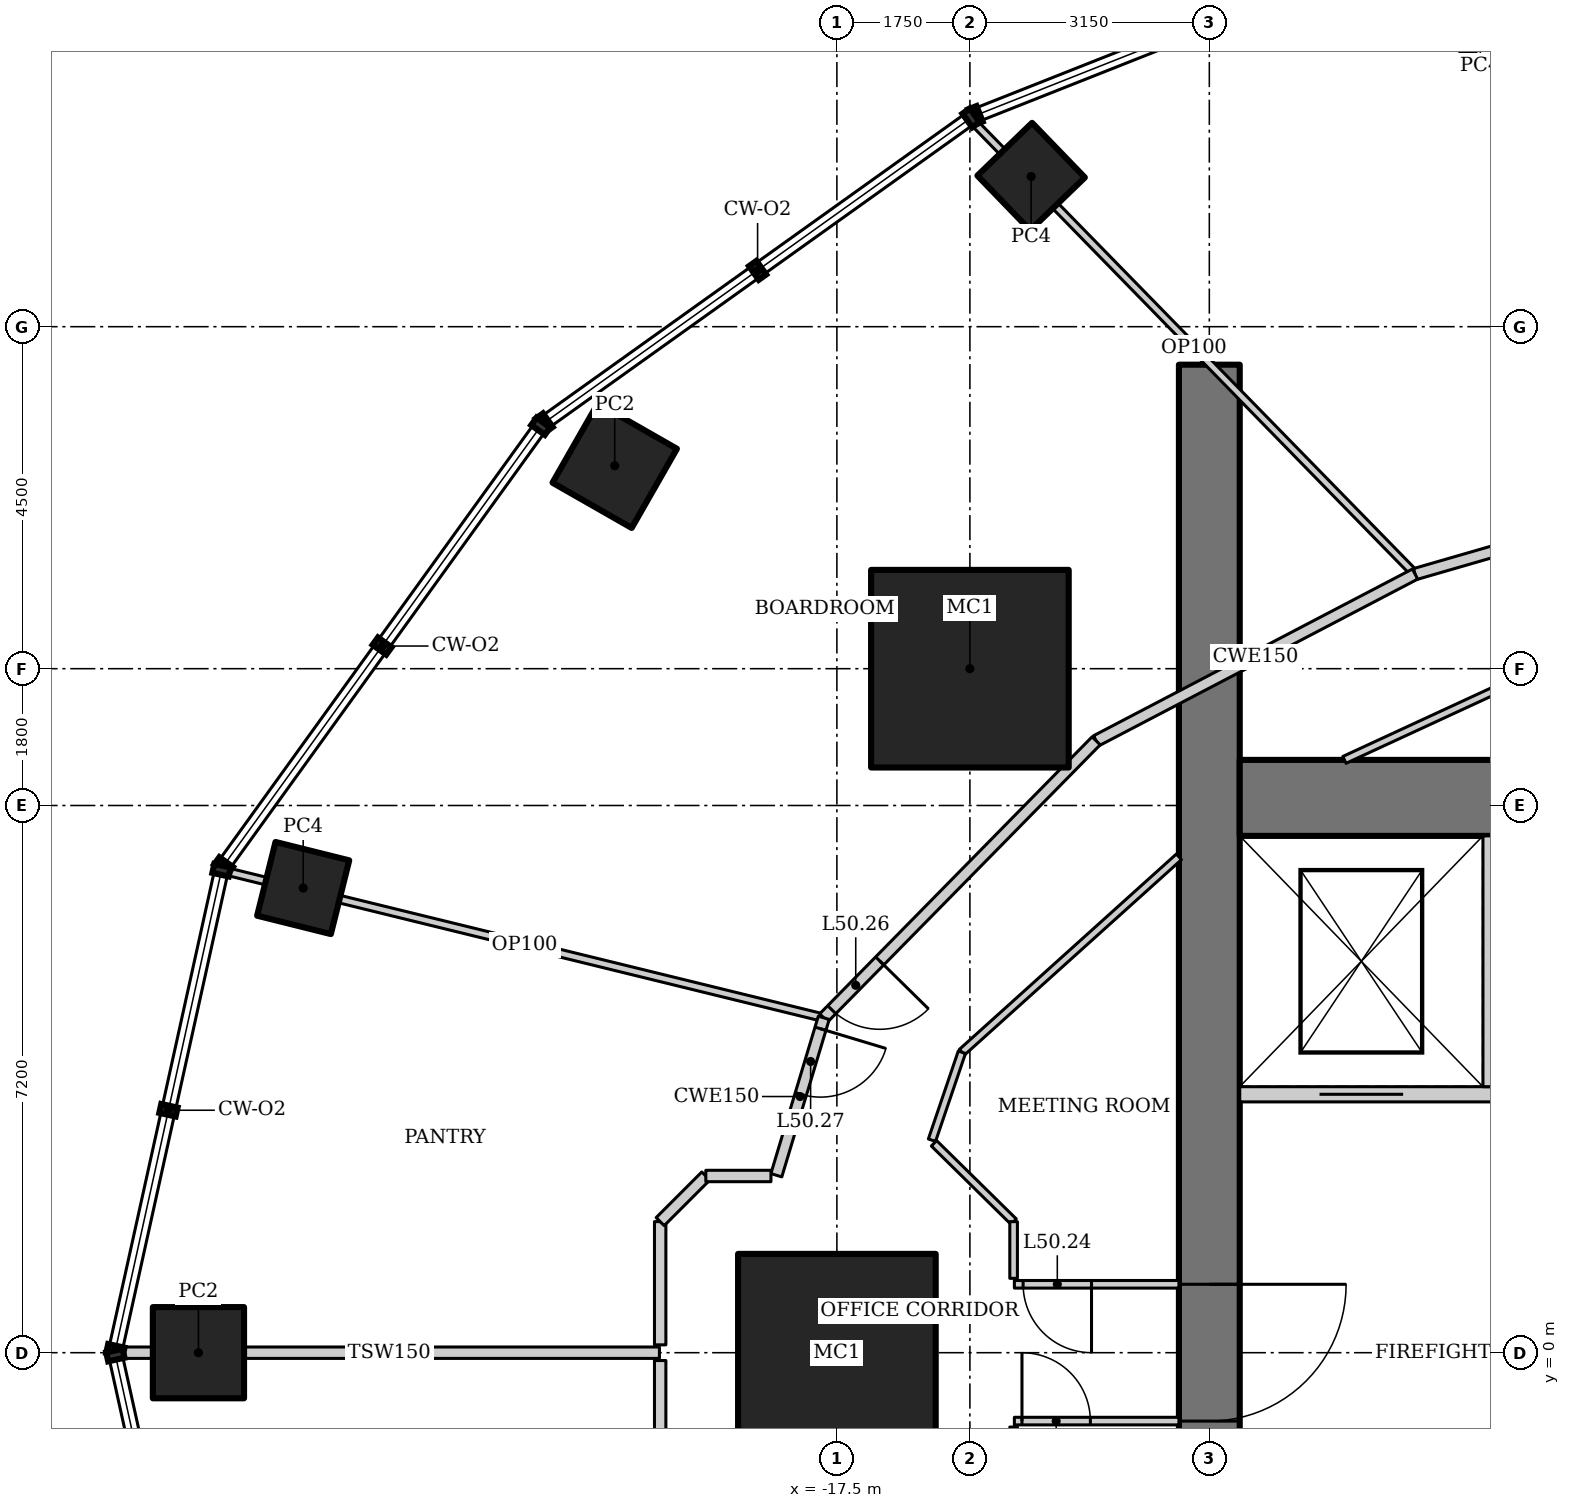
"""IFC4 building model, lengths in metres.
Left out: names, types, materials, properties, quantities, classifications, styles, units other than length and angle.
Written with IfcOpenShell. Run it as: python <this file> out.ifc"""

import sys

from ifc_helpers import new_model, si_unit, direction, frame, frame_2d, origin, origin_2d, place, context, subcontext, project, spatial, rectangle, hollow_rectangle, extrude, element, fill, save


model = new_model("IFC4")
c1 = context("Model", 3, precision=1e-05, world=origin(), true_north=direction((0.0, 1.0)))
c2 = subcontext(c1, "Body", "Model", "MODEL_VIEW")
j1 = project(units=[si_unit("LENGTHUNIT", "METRE"), si_unit("PLANEANGLEUNIT", "RADIAN")], contexts=[c1])
p1 = place(None, origin())
s1 = spatial("IfcSite", under=j1, at=p1, CompositionType="ELEMENT")
p2 = place(p1, origin())
s2 = spatial("IfcBuilding", under=s1, at=p2, CompositionType="ELEMENT")
p3 = place(p2, frame((0.0, 0.0, 215.8)))
s3 = spatial("IfcBuildingStorey", under=s2, at=p3, CompositionType="ELEMENT", Elevation=215.8)
for number, where, z_axis, x_axis in (
    (1, (-15.75, 9.0, 0.0), (0.0, 0.0, 1.0), (1.0, 0.0, 0.0)),
    (2, (-17.5, 0.0, 0.0), (0.0, 0.0, 1.0), (1.0, 0.0, 0.0)),
):
    element("IfcColumn", number, at=place(p3, frame(where, z_axis=z_axis, x_axis=x_axis)), inside=s3, PredefinedType="COLUMN", context=c2, shape_type="SweptSolid", body=[
        extrude(hollow_rectangle(XDim=2.6, YDim=2.6, WallThickness=0.13, at=origin_2d()), origin(), (0.0, 0.0, 1.0), 4.2),
    ])
for number, where, z_axis, x_axis in (
    (3, (-9.035, 17.731, 0.0), (0.0, 0.0, 1.0), (0.891, 0.454, 0.0)),
    (4, (-14.944, 15.475, 0.0), (0.0, 0.0, 1.0), (0.719, 0.695, 0.0)),
):
    element("IfcColumn", number, at=place(p3, frame(where, z_axis=z_axis, x_axis=x_axis)), inside=s3, PredefinedType="COLUMN", context=c2, shape_type="SweptSolid", body=[
        extrude(hollow_rectangle(XDim=1.0, YDim=1.0, WallThickness=0.08, at=origin_2d()), origin(), (0.0, 0.0, 1.0), 4.2),
    ])
p4 = place(p3, frame((-20.423, 11.67, 0.0), z_axis=(0.0, 0.0, 1.0), x_axis=(0.496139221777, 0.86824298017, 0.0)))
e5 = element("IfcColumn", 5, at=p4, inside=s3, PredefinedType="COLUMN", context=c2, shape_type="SweptSolid", body=[
    extrude(hollow_rectangle(XDim=1.2, YDim=1.2, WallThickness=0.1, at=origin_2d()), origin(), (0.0, 0.0, 1.0), 4.2),
])
p5 = place(p3, frame((-24.522, 6.114, 0.0), z_axis=(0.0, 0.0, 1.0), x_axis=(0.2419218956, 0.970295726276, 0.0)))
e6 = element("IfcColumn", 6, at=p5, inside=s3, PredefinedType="COLUMN", context=c2, shape_type="SweptSolid", body=[
    extrude(hollow_rectangle(XDim=1.0, YDim=1.0, WallThickness=0.08, at=origin_2d()), origin(), (0.0, 0.0, 1.0), 4.2),
])
p6 = place(p3, frame((-25.9, 0.0, 0.0), z_axis=(0.0, 0.0, 1.0), x_axis=(1.0, 0.0, 0.0)))
e7 = element("IfcColumn", 7, at=p6, inside=s3, PredefinedType="COLUMN", context=c2, shape_type="SweptSolid", body=[
    extrude(hollow_rectangle(XDim=1.2, YDim=1.2, WallThickness=0.1, at=origin_2d()), origin(), (0.0, 0.0, 1.0), 4.2),
])
p7 = place(p3, frame((-12.6, 13.0, 0.0), z_axis=(0.0, 0.0, 1.0), x_axis=(0.0, -1.0, 0.0)))
e8 = element("IfcWall", 8, at=p7, inside=s3, PredefinedType="SHEAR", context=c2, shape_type="SweptSolid", body=[
    extrude(rectangle(XDim=26.0, YDim=0.8, at=frame_2d((13.0, 0.0))), origin(), (0.0, 0.0, 1.0), 4.2),
])
p8 = place(p7, frame((12.1, 0.0, 0.0)))
e9 = element("IfcOpeningElement", 9, at=p8, cuts=e8, PredefinedType="OPENING", context=c2, shape_type="SweptSolid", body=[
    extrude(rectangle(XDim=1.8, YDim=2.1, at=frame_2d((0.9, 1.05))), frame((0.0, 0.41, 0.0), z_axis=(0.0, -1.0, 0.0), x_axis=(1.0, 0.0, 0.0)), (0.0, 0.0, 1.0), 0.82),
])
p9 = place(p3, frame((-5.6, 7.3, 0.0), z_axis=(0.0, 0.0, 1.0), x_axis=(-1.0, 0.0, 0.0)))
e10 = element("IfcWall", 10, at=p9, inside=s3, PredefinedType="SHEAR", context=c2, shape_type="SweptSolid", body=[
    extrude(rectangle(XDim=6.6, YDim=1.0, at=frame_2d((3.3, 0.0))), origin(), (0.0, 0.0, 1.0), 4.2),
])
p10 = place(p3, frame((-12.2, 3.4, 0.0), z_axis=(0.0, 0.0, 1.0), x_axis=(1.0, 0.0, 0.0)))
e11 = element("IfcWall", 11, at=p10, inside=s3, PredefinedType="SOLIDWALL", context=c2, shape_type="SweptSolid", body=[
    extrude(rectangle(XDim=6.6, YDim=0.2, at=frame_2d((3.3, 0.0))), origin(), (0.0, 0.0, 1.0), 4.2),
])
p11 = place(p10, frame((1.05, 0.0, 0.0)))
e12 = element("IfcOpeningElement", 12, at=p11, cuts=e11, PredefinedType="OPENING", context=c2, shape_type="SweptSolid", body=[
    extrude(rectangle(XDim=1.1, YDim=2.2, at=frame_2d((0.55, 1.1))), frame((0.0, 0.11, 0.0), z_axis=(0.0, -1.0, 0.0), x_axis=(1.0, 0.0, 0.0)), (0.0, 0.0, 1.0), 0.22),
])
p12 = place(p10, frame((4.3, 0.0, 0.0)))
e13 = element("IfcOpeningElement", 13, at=p12, cuts=e11, PredefinedType="OPENING", context=c2, shape_type="SweptSolid", body=[
    extrude(rectangle(XDim=1.4, YDim=2.2, at=frame_2d((0.7, 1.1))), frame((0.0, 0.11, 0.0), z_axis=(0.0, -1.0, 0.0), x_axis=(1.0, 0.0, 0.0)), (0.0, 0.0, 1.0), 0.22),
])
p13 = place(p3, frame((-8.9, 3.5, 0.0), z_axis=(0.0, 0.0, 1.0), x_axis=(0.0, 1.0, 0.0)))
e14 = element("IfcWall", 14, at=p13, inside=s3, PredefinedType="SOLIDWALL", context=c2, shape_type="SweptSolid", body=[
    extrude(rectangle(XDim=3.3, YDim=0.2, at=frame_2d((1.65, 0.0))), origin(), (0.0, 0.0, 1.0), 4.2),
])
p14 = place(p3, frame((-15.709, 16.199, 0.0), z_axis=(0.0, 0.0, 1.0), x_axis=(0.69875697861, -0.715359129978, 0.0)))
e15 = element("IfcWall", 15, at=p14, inside=s3, PredefinedType="PARTITIONING", context=c2, shape_type="SweptSolid", body=[
    extrude(rectangle(XDim=8.323, YDim=0.1, at=frame_2d((4.162, 0.0))), origin(), (0.0, 0.0, 1.0), 3.41),
])
p15 = place(p3, frame((-25.543, 6.336, 0.0), z_axis=(0.0, 0.0, 1.0), x_axis=(0.97123661777, -0.238116425942, 0.0)))
e16 = element("IfcWall", 16, at=p15, inside=s3, PredefinedType="PARTITIONING", context=c2, shape_type="SweptSolid", body=[
    extrude(rectangle(XDim=8.103, YDim=0.1, at=frame_2d((4.052, 0.0))), origin(), (0.0, 0.0, 1.0), 3.108),
])
p16 = place(p3, frame((-5.82, 11.423, 0.0), z_axis=(0.0, 0.0, 1.0), x_axis=(-0.960614838378, -0.27788330696, 0.0)))
e17 = element("IfcWall", 17, at=p16, inside=s3, PredefinedType="PARTITIONING", context=c2, shape_type="SweptSolid", body=[
    extrude(rectangle(XDim=4.24, YDim=0.15, at=frame_2d((2.12, 0.0))), origin(), (0.0, 0.0, 1.0), 4.05),
])
p17 = place(p3, frame((-9.893, 10.245, 0.0), z_axis=(0.0, 0.0, 1.0), x_axis=(-0.886174439647, -0.463351769735, 0.0)))
e18 = element("IfcWall", 18, at=p17, inside=s3, PredefinedType="PARTITIONING", context=c2, shape_type="SweptSolid", body=[
    extrude(rectangle(XDim=4.735, YDim=0.15, at=frame_2d((2.367, 0.0))), origin(), (0.0, 0.0, 1.0), 4.05),
])
p18 = place(p3, frame((-14.089, 8.051, 0.0), z_axis=(0.0, 0.0, 1.0), x_axis=(-0.701111216625, -0.713051934941, 0.0)))
e19 = element("IfcWall", 19, at=p18, inside=s3, PredefinedType="PARTITIONING", context=c2, shape_type="SweptSolid", body=[
    extrude(rectangle(XDim=5.112, YDim=0.15, at=frame_2d((2.556, 0.0))), origin(), (0.0, 0.0, 1.0), 4.05),
])
p19 = place(p18, frame((4.061, 0.0, 0.0)))
e20 = element("IfcOpeningElement", 20, at=p19, cuts=e19, PredefinedType="OPENING", context=c2, shape_type="SweptSolid", body=[
    extrude(rectangle(XDim=0.9, YDim=2.1, at=frame_2d((0.45, 1.05))), frame((0.0, 0.085, 0.0), z_axis=(0.0, -1.0, 0.0), x_axis=(1.0, 0.0, 0.0)), (0.0, 0.0, 1.0), 0.17),
])
p20 = place(p3, frame((-10.823, 7.8, 0.0), z_axis=(0.0, 0.0, 1.0), x_axis=(0.907759689292, 0.419490579748, 0.0)))
e21 = element("IfcWall", 21, at=p20, inside=s3, PredefinedType="PARTITIONING", context=c2, shape_type="SweptSolid", body=[
    extrude(rectangle(XDim=2.506, YDim=0.1, at=frame_2d((1.253, 0.0))), origin(), (0.0, 0.0, 1.0), 4.05),
])
p21 = place(p3, frame((-15.856, 3.953, 0.0), z_axis=(0.0, 0.0, 1.0), x_axis=(0.743177243228, 0.669094601046, 0.0)))
e22 = element("IfcWall", 22, at=p21, inside=s3, PredefinedType="PARTITIONING", context=c2, shape_type="SweptSolid", body=[
    extrude(rectangle(XDim=3.843, YDim=0.1, at=frame_2d((1.921, 0.0))), origin(), (0.0, 0.0, 1.0), 4.05),
])
p22 = place(p3, frame((-26.944, 0.0, 0.0), z_axis=(0.0, 0.0, 1.0), x_axis=(1.0, 0.0, 0.0)))
e23 = element("IfcWall", 23, at=p22, inside=s3, PredefinedType="PARTITIONING", context=c2, shape_type="SweptSolid", body=[
    extrude(rectangle(XDim=7.109, YDim=0.15, at=frame_2d((3.555, 0.0))), origin(), (0.0, 0.0, 1.0), 3.349),
])
p23 = place(p3, frame((-17.673, 4.406, 0.0), z_axis=(0.0, 0.0, 1.0), x_axis=(-0.288362447016, -0.957521330912, 0.0)))
e24 = element("IfcWall", 24, at=p23, inside=s3, PredefinedType="PARTITIONING", context=c2, shape_type="SweptSolid", body=[
    extrude(rectangle(XDim=2.163, YDim=0.15, at=frame_2d((1.082, 0.0))), origin(), (0.0, 0.0, 1.0), 4.05),
])
p24 = place(p23, frame((0.15, 0.0, 0.0)))
e25 = element("IfcOpeningElement", 25, at=p24, cuts=e24, PredefinedType="OPENING", context=c2, shape_type="SweptSolid", body=[
    extrude(rectangle(XDim=0.9, YDim=2.1, at=frame_2d((0.45, 1.05))), frame((0.0, 0.085, 0.0), z_axis=(0.0, -1.0, 0.0), x_axis=(1.0, 0.0, 0.0)), (0.0, 0.0, 1.0), 0.17),
])
p25 = place(p3, frame((-15.165, -0.9, 0.0), z_axis=(0.0, 0.0, 1.0), x_axis=(1.0, 0.0, 0.0)))
e26 = element("IfcWall", 26, at=p25, inside=s3, PredefinedType="PARTITIONING", context=c2, shape_type="SweptSolid", body=[
    extrude(rectangle(XDim=2.165, YDim=0.1, at=frame_2d((1.083, 0.0))), origin(), (0.0, 0.0, 1.0), 4.05),
])
p26 = place(p25, frame((0.1, 0.0, 0.0)))
e27 = element("IfcOpeningElement", 27, at=p26, cuts=e26, PredefinedType="OPENING", context=c2, shape_type="SweptSolid", body=[
    extrude(rectangle(XDim=0.9, YDim=2.1, at=frame_2d((0.45, 1.05))), frame((0.0, 0.06, 0.0), z_axis=(0.0, -1.0, 0.0), x_axis=(1.0, 0.0, 0.0)), (0.0, 0.0, 1.0), 0.12),
])
p27 = place(p3, frame((-13.0, 0.9, 0.0), z_axis=(0.0, 0.0, 1.0), x_axis=(-1.0, 0.0, 0.0)))
e28 = element("IfcWall", 28, at=p27, inside=s3, PredefinedType="PARTITIONING", context=c2, shape_type="SweptSolid", body=[
    extrude(rectangle(XDim=2.165, YDim=0.1, at=frame_2d((1.083, 0.0))), origin(), (0.0, 0.0, 1.0), 4.05),
])
p28 = place(p27, frame((1.15, 0.0, 0.0)))
e29 = element("IfcOpeningElement", 29, at=p28, cuts=e28, PredefinedType="OPENING", context=c2, shape_type="SweptSolid", body=[
    extrude(rectangle(XDim=0.9, YDim=2.1, at=frame_2d((0.45, 1.05))), frame((0.0, 0.06, 0.0), z_axis=(0.0, -1.0, 0.0), x_axis=(1.0, 0.0, 0.0)), (0.0, 0.0, 1.0), 0.12),
])
p29 = place(p3, frame((-16.249, 2.796, 0.0), z_axis=(0.0, 0.0, 1.0), x_axis=(0.321913473529, 0.946769093053, 0.0)))
e30 = element("IfcWall", 30, at=p29, inside=s3, PredefinedType="PARTITIONING", context=c2, shape_type="SweptSolid", body=[
    extrude(rectangle(XDim=1.223, YDim=0.1, at=frame_2d((0.611, 0.0))), origin(), (0.0, 0.0, 1.0), 4.05),
])
p30 = place(p3, frame((-15.175, -0.978, 0.0), z_axis=(0.0, 0.0, 1.0), x_axis=(0.0, -1.0, 0.0)))
e31 = element("IfcWall", 31, at=p30, inside=s3, PredefinedType="PARTITIONING", context=c2, shape_type="SweptSolid", body=[
    extrude(rectangle(XDim=0.746, YDim=0.1, at=frame_2d((0.373, 0.0))), origin(), (0.0, 0.0, 1.0), 4.05),
])
p31 = place(p3, frame((-16.223, 2.755, 0.0), z_axis=(0.0, 0.0, 1.0), x_axis=(0.712897698193, -0.701268045694, 0.0)))
e32 = element("IfcWall", 32, at=p31, inside=s3, PredefinedType="PARTITIONING", context=c2, shape_type="SweptSolid", body=[
    extrude(rectangle(XDim=1.469, YDim=0.1, at=frame_2d((0.735, 0.0))), origin(), (0.0, 0.0, 1.0), 4.05),
])
p32 = place(p3, frame((-15.175, 1.725, 0.0), z_axis=(0.0, 0.0, 1.0), x_axis=(0.0, -1.0, 0.0)))
e33 = element("IfcWall", 33, at=p32, inside=s3, PredefinedType="PARTITIONING", context=c2, shape_type="SweptSolid", body=[
    extrude(rectangle(XDim=0.746, YDim=0.1, at=frame_2d((0.373, 0.0))), origin(), (0.0, 0.0, 1.0), 4.05),
])
p33 = place(p3, frame((-19.825, 0.103, 0.0), z_axis=(0.0, 0.0, 1.0), x_axis=(0.0, 1.0, 0.0)))
e34 = element("IfcWall", 34, at=p33, inside=s3, PredefinedType="PARTITIONING", context=c2, shape_type="SweptSolid", body=[
    extrude(rectangle(XDim=1.621, YDim=0.15, at=frame_2d((0.811, 0.0))), origin(), (0.0, 0.0, 1.0), 4.05),
])
p34 = place(p3, frame((-19.825, 1.725, 0.0), z_axis=(0.0, 0.0, 1.0), x_axis=(0.707106781187, 0.707106781187, 0.0)))
e35 = element("IfcWall", 35, at=p34, inside=s3, PredefinedType="PARTITIONING", context=c2, shape_type="SweptSolid", body=[
    extrude(rectangle(XDim=0.849, YDim=0.15, at=frame_2d((0.425, 0.0))), origin(), (0.0, 0.0, 1.0), 4.05),
])
p35 = place(p3, frame((-19.225, 2.325, 0.0), z_axis=(0.0, 0.0, 1.0), x_axis=(1.0, 0.0, 0.0)))
e36 = element("IfcWall", 36, at=p35, inside=s3, PredefinedType="PARTITIONING", context=c2, shape_type="SweptSolid", body=[
    extrude(rectangle(XDim=0.857, YDim=0.15, at=frame_2d((0.429, 0.0))), origin(), (0.0, 0.0, 1.0), 4.05),
])
p36 = place(p3, frame((-19.825, -1.725, 0.0), z_axis=(0.0, 0.0, 1.0), x_axis=(0.0, 1.0, 0.0)))
e37 = element("IfcWall", 37, at=p36, inside=s3, PredefinedType="PARTITIONING", context=c2, shape_type="SweptSolid", body=[
    extrude(rectangle(XDim=1.621, YDim=0.15, at=frame_2d((0.811, 0.0))), origin(), (0.0, 0.0, 1.0), 4.05),
])
p37 = place(p8, origin())
e38 = element("IfcDoor", 38, at=p37, inside=s3, OperationType="DOUBLE_DOOR_DOUBLE_SWING", PredefinedType="DOOR", context=c2, shape_type="SweptSolid", body=[
    extrude(rectangle(XDim=1.8, YDim=2.1, at=frame_2d((0.9, 1.05))), frame((0.0, 0.025, 0.0), z_axis=(0.0, -1.0, 0.0), x_axis=(1.0, 0.0, 0.0)), (0.0, 0.0, 1.0), 0.05),
])
fill(e9, e38)
p38 = place(p11, origin())
e39 = element("IfcDoor", 39, at=p38, inside=s3, OperationType="DOUBLE_DOOR_SLIDING", PredefinedType="DOOR", context=c2, shape_type="SweptSolid", body=[
    extrude(rectangle(XDim=1.1, YDim=2.2, at=frame_2d((0.55, 1.1))), frame((0.0, 0.025, 0.0), z_axis=(0.0, -1.0, 0.0), x_axis=(1.0, 0.0, 0.0)), (0.0, 0.0, 1.0), 0.05),
])
fill(e12, e39)
p39 = place(p26, origin())
e40 = element("IfcDoor", 40, at=p39, inside=s3, OperationType="SINGLE_SWING_LEFT", PredefinedType="DOOR", context=c2, shape_type="SweptSolid", body=[
    extrude(rectangle(XDim=0.9, YDim=2.1, at=frame_2d((0.45, 1.05))), frame((0.0, 0.025, 0.0), z_axis=(0.0, -1.0, 0.0), x_axis=(1.0, 0.0, 0.0)), (0.0, 0.0, 1.0), 0.05),
])
fill(e27, e40)
p40 = place(p28, origin())
e41 = element("IfcDoor", 41, at=p40, inside=s3, OperationType="SINGLE_SWING_LEFT", PredefinedType="DOOR", context=c2, shape_type="SweptSolid", body=[
    extrude(rectangle(XDim=0.9, YDim=2.1, at=frame_2d((0.45, 1.05))), frame((0.0, 0.025, 0.0), z_axis=(0.0, -1.0, 0.0), x_axis=(1.0, 0.0, 0.0)), (0.0, 0.0, 1.0), 0.05),
])
fill(e29, e41)
p41 = place(p19, origin())
e42 = element("IfcDoor", 42, at=p41, inside=s3, OperationType="SINGLE_SWING_LEFT", PredefinedType="DOOR", context=c2, shape_type="SweptSolid", body=[
    extrude(rectangle(XDim=0.9, YDim=2.1, at=frame_2d((0.45, 1.05))), frame((0.0, 0.025, 0.0), z_axis=(0.0, -1.0, 0.0), x_axis=(1.0, 0.0, 0.0)), (0.0, 0.0, 1.0), 0.05),
])
fill(e20, e42)
p42 = place(p24, origin())
e43 = element("IfcDoor", 43, at=p42, inside=s3, OperationType="SINGLE_SWING_LEFT", PredefinedType="DOOR", context=c2, shape_type="SweptSolid", body=[
    extrude(rectangle(XDim=0.9, YDim=2.1, at=frame_2d((0.45, 1.05))), frame((0.0, 0.025, 0.0), z_axis=(0.0, -1.0, 0.0), x_axis=(1.0, 0.0, 0.0)), (0.0, 0.0, 1.0), 0.05),
])
fill(e25, e43)
save(model, sys.argv[1])
